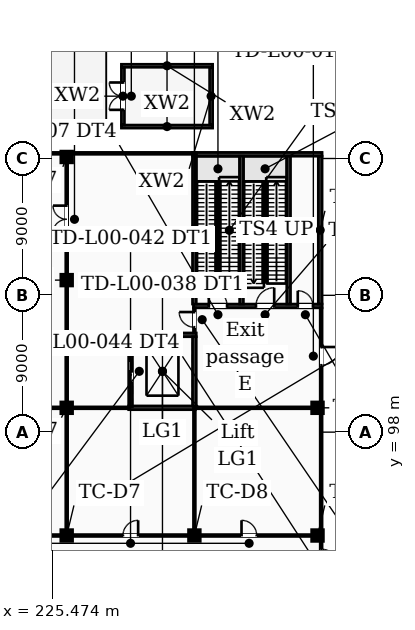
"""IFC4 building model, lengths in metres.
Left out: names, types, materials, properties, quantities, classifications, styles, units other than length and angle.
Written with IfcOpenShell. Run it as: python <this file> out.ifc"""

import sys

from ifc_helpers import new_model, si_unit, direction, frame, frame_2d, origin, origin_2d, place, context, subcontext, project, spatial, rectangle, extrude, element, fill, save


model = new_model("IFC4")
c1 = context("Model", 3, precision=1e-05, world=origin(), true_north=direction((0.0, 1.0)))
c2 = subcontext(c1, "Body", "Model", "MODEL_VIEW")
j1 = project(units=[si_unit("LENGTHUNIT", "METRE"), si_unit("PLANEANGLEUNIT", "RADIAN")], contexts=[c1])
p1 = place(None, origin())
s1 = spatial("IfcSite", under=j1, at=p1, CompositionType="ELEMENT")
p2 = place(p1, origin())
s2 = spatial("IfcBuilding", under=s1, at=p2, CompositionType="ELEMENT")
p3 = place(p2, origin())
s3 = spatial("IfcBuildingStorey", under=s2, at=p3, CompositionType="ELEMENT", Elevation=0.0)
p4 = place(p3, frame((218.2, 91.2, 0.0), z_axis=(0.0, 0.0, 1.0), x_axis=(1.0, 0.0, 0.0)))
e1 = element("IfcWall", 1, at=p4, inside=s3, PredefinedType="PARTITIONING", context=c2, shape_type="SweptSolid", body=[
    extrude(rectangle(XDim=7.9, YDim=0.125, at=frame_2d((3.95, 0.0))), origin(), (0.0, 0.0, 1.0), 8.7),
])
p5 = place(p4, frame((3.5, 0.0, 0.0)))
e2 = element("IfcOpeningElement", 2, at=p5, cuts=e1, PredefinedType="OPENING", context=c2, shape_type="SweptSolid", body=[
    extrude(rectangle(XDim=1.0, YDim=2.1, at=frame_2d((0.5, 1.05))), frame((0.0, 0.073, 0.0), z_axis=(0.0, -1.0, 0.0), x_axis=(1.0, 0.0, 0.0)), (0.0, 0.0, 1.0), 0.145),
])
p6 = place(p3, frame((226.7, 91.2, 0.0), z_axis=(0.0, 0.0, 1.0), x_axis=(1.0, 0.0, 0.0)))
e3 = element("IfcWall", 3, at=p6, inside=s3, PredefinedType="PARTITIONING", context=c2, shape_type="SweptSolid", body=[
    extrude(rectangle(XDim=7.8, YDim=0.125, at=frame_2d((3.9, 0.0))), origin(), (0.0, 0.0, 1.0), 8.7),
])
p7 = place(p6, frame((3.4, 0.0, 0.0)))
e4 = element("IfcOpeningElement", 4, at=p7, cuts=e3, PredefinedType="OPENING", context=c2, shape_type="SweptSolid", body=[
    extrude(rectangle(XDim=1.0, YDim=2.1, at=frame_2d((0.5, 1.05))), frame((0.0, 0.073, 0.0), z_axis=(0.0, -1.0, 0.0), x_axis=(1.0, 0.0, 0.0)), (0.0, 0.0, 1.0), 0.145),
])
p8 = place(p3, frame((235.1, 91.2, 0.0), z_axis=(0.0, 0.0, 1.0), x_axis=(1.0, 0.0, 0.0)))
e5 = element("IfcWall", 5, at=p8, inside=s3, PredefinedType="PARTITIONING", context=c2, shape_type="SweptSolid", body=[
    extrude(rectangle(XDim=7.5, YDim=0.125, at=frame_2d((3.75, 0.0))), origin(), (0.0, 0.0, 1.0), 8.7),
])
p9 = place(p8, frame((2.8, 0.0, 0.0)))
e6 = element("IfcOpeningElement", 6, at=p9, cuts=e5, PredefinedType="OPENING", context=c2, shape_type="SweptSolid", body=[
    extrude(rectangle(XDim=1.0, YDim=2.1, at=frame_2d((0.5, 1.05))), frame((0.0, 0.073, 0.0), z_axis=(0.0, -1.0, 0.0), x_axis=(1.0, 0.0, 0.0)), (0.0, 0.0, 1.0), 0.145),
])
p10 = place(p3, frame((218.2, 99.6, 0.0), z_axis=(0.0, 0.0, 1.0), x_axis=(1.0, 0.0, 0.0)))
e7 = element("IfcWall", 7, at=p10, inside=s3, PredefinedType="PARTITIONING", context=c2, shape_type="SweptSolid", body=[
    extrude(rectangle(XDim=7.9, YDim=0.125, at=frame_2d((3.95, 0.0))), origin(), (0.0, 0.0, 1.0), 8.7),
])
p11 = place(p10, frame((3.1, 0.0, 0.0)))
e8 = element("IfcOpeningElement", 8, at=p11, cuts=e7, PredefinedType="OPENING", context=c2, shape_type="SweptSolid", body=[
    extrude(rectangle(XDim=1.8, YDim=2.1, at=frame_2d((0.9, 1.05))), frame((0.0, 0.073, 0.0), z_axis=(0.0, -1.0, 0.0), x_axis=(1.0, 0.0, 0.0)), (0.0, 0.0, 1.0), 0.145),
])
p12 = place(p3, frame((226.7, 99.6, 0.0), z_axis=(0.0, 0.0, 1.0), x_axis=(1.0, 0.0, 0.0)))
e9 = element("IfcWall", 9, at=p12, inside=s3, PredefinedType="PARTITIONING", context=c2, shape_type="SweptSolid", body=[
    extrude(rectangle(XDim=4.025, YDim=0.125, at=frame_2d((2.013, 0.0))), origin(), (0.0, 0.0, 1.0), 8.7),
])
p13 = place(p3, frame((230.475, 99.6, 0.0), z_axis=(0.0, 0.0, 1.0), x_axis=(1.0, 0.0, 0.0)))
e10 = element("IfcWall", 10, at=p13, inside=s3, PredefinedType="SOLIDWALL", context=c2, shape_type="SweptSolid", body=[
    extrude(rectangle(XDim=4.387, YDim=0.25, at=frame_2d((2.194, 0.0))), origin(), (0.0, 0.0, 1.0), 8.7),
])
p14 = place(p3, frame((234.738, 99.6, 0.0), z_axis=(0.0, 0.0, 1.0), x_axis=(1.0, 0.0, 0.0)))
e11 = element("IfcWall", 11, at=p14, inside=s3, PredefinedType="PARTITIONING", context=c2, shape_type="SweptSolid", body=[
    extrude(rectangle(XDim=7.863, YDim=0.125, at=frame_2d((3.931, 0.0))), origin(), (0.0, 0.0, 1.0), 8.7),
])
p15 = place(p3, frame((230.475, 104.4, 0.0), z_axis=(0.0, 0.0, 1.0), x_axis=(1.0, 0.0, 0.0)))
e12 = element("IfcWall", 12, at=p15, inside=s3, PredefinedType="SOLIDWALL", context=c2, shape_type="SweptSolid", body=[
    extrude(rectangle(XDim=4.45, YDim=0.25, at=frame_2d((2.225, 0.0))), origin(), (0.0, 0.0, 1.0), 8.7),
])
p16 = place(p3, frame((234.738, 106.3, 0.0), z_axis=(0.0, 0.0, 1.0), x_axis=(1.0, 0.0, 0.0)))
e13 = element("IfcWall", 13, at=p16, inside=s3, PredefinedType="SOLIDWALL", context=c2, shape_type="SweptSolid", body=[
    extrude(rectangle(XDim=8.462, YDim=0.25, at=frame_2d((4.231, 0.0))), origin(), (0.0, 0.0, 1.0), 8.7),
])
p17 = place(p16, frame((1.012, 0.0, 0.0)))
e14 = element("IfcOpeningElement", 14, at=p17, cuts=e13, PredefinedType="OPENING", context=c2, shape_type="SweptSolid", body=[
    extrude(rectangle(XDim=1.2, YDim=2.1, at=frame_2d((0.6, 1.05))), frame((0.0, 0.135, 0.0), z_axis=(0.0, -1.0, 0.0), x_axis=(1.0, 0.0, 0.0)), (0.0, 0.0, 1.0), 0.27),
])
p18 = place(p16, frame((4.113, 0.0, 0.0)))
e15 = element("IfcOpeningElement", 15, at=p18, cuts=e13, PredefinedType="OPENING", context=c2, shape_type="SweptSolid", body=[
    extrude(rectangle(XDim=1.2, YDim=2.1, at=frame_2d((0.6, 1.05))), frame((0.0, 0.135, 0.0), z_axis=(0.0, -1.0, 0.0), x_axis=(1.0, 0.0, 0.0)), (0.0, 0.0, 1.0), 0.27),
])
p19 = place(p16, frame((6.863, 0.0, 0.0)))
e16 = element("IfcOpeningElement", 16, at=p19, cuts=e13, PredefinedType="OPENING", context=c2, shape_type="SweptSolid", body=[
    extrude(rectangle(XDim=1.0, YDim=2.1, at=frame_2d((0.5, 1.05))), frame((0.0, 0.135, 0.0), z_axis=(0.0, -1.0, 0.0), x_axis=(1.0, 0.0, 0.0)), (0.0, 0.0, 1.0), 0.27),
])
p20 = place(p3, frame((234.675, 116.275, 0.0), z_axis=(0.0, 0.0, 1.0), x_axis=(1.0, 0.0, 0.0)))
e17 = element("IfcWall", 17, at=p20, inside=s3, PredefinedType="SOLIDWALL", context=c2, shape_type="SweptSolid", body=[
    extrude(rectangle(XDim=8.525, YDim=0.25, at=frame_2d((4.262, 0.0))), origin(), (0.0, 0.0, 1.0), 8.7),
])
p21 = place(p3, frame((217.8, 116.337, 0.0), z_axis=(0.0, 0.0, 1.0), x_axis=(1.0, 0.0, 0.0)))
e18 = element("IfcWall", 18, at=p21, inside=s3, PredefinedType="PARTITIONING", context=c2, shape_type="SweptSolid", body=[
    extrude(rectangle(XDim=8.3, YDim=0.125, at=frame_2d((4.15, 0.0))), origin(), (0.0, 0.0, 1.0), 8.7),
])
p22 = place(p3, frame((226.7, 116.337, 0.0), z_axis=(0.0, 0.0, 1.0), x_axis=(1.0, 0.0, 0.0)))
e19 = element("IfcWall", 19, at=p22, inside=s3, PredefinedType="PARTITIONING", context=c2, shape_type="SweptSolid", body=[
    extrude(rectangle(XDim=8.225, YDim=0.125, at=frame_2d((4.113, 0.0))), origin(), (0.0, 0.0, 1.0), 8.7),
])
for number, where, z_axis, x_axis in (
    (20, (226.4, 91.5, 0.0), (0.0, 0.0, 1.0), (0.0, 1.0, 0.0)),
    (21, (226.4, 99.9, 0.0), (0.0, 0.0, 1.0), (0.0, 1.0, 0.0)),
):
    element("IfcWall", number, at=place(p3, frame(where, z_axis=z_axis, x_axis=x_axis)), inside=s3, PredefinedType="PARTITIONING", context=c2, shape_type="SweptSolid", body=[
        extrude(rectangle(XDim=7.8, YDim=0.125, at=frame_2d((3.9, 0.0))), origin(), (0.0, 0.0, 1.0), 8.7),
    ])
p23 = place(p3, frame((226.4, 108.3, 0.0), z_axis=(0.0, 0.0, 1.0), x_axis=(0.0, 1.0, 0.0)))
e22 = element("IfcWall", 22, at=p23, inside=s3, PredefinedType="PARTITIONING", context=c2, shape_type="SweptSolid", body=[
    extrude(rectangle(XDim=7.5, YDim=0.125, at=frame_2d((3.75, 0.0))), origin(), (0.0, 0.0, 1.0), 8.7),
])
p24 = place(p23, frame((2.8, 0.0, 0.0)))
e23 = element("IfcOpeningElement", 23, at=p24, cuts=e22, PredefinedType="OPENING", context=c2, shape_type="SweptSolid", body=[
    extrude(rectangle(XDim=1.8, YDim=2.1, at=frame_2d((0.9, 1.05))), frame((0.0, 0.073, 0.0), z_axis=(0.0, -1.0, 0.0), x_axis=(1.0, 0.0, 0.0)), (0.0, 0.0, 1.0), 0.145),
])
p25 = place(p3, frame((230.6, 99.663, 0.0), z_axis=(0.0, 0.0, 1.0), x_axis=(0.0, 1.0, 0.0)))
e24 = element("IfcWall", 24, at=p25, inside=s3, PredefinedType="SOLIDWALL", context=c2, shape_type="SweptSolid", body=[
    extrude(rectangle(XDim=4.612, YDim=0.25, at=frame_2d((2.306, 0.0))), origin(), (0.0, 0.0, 1.0), 8.7),
])
p26 = place(p25, frame((1.637, 0.0, 0.0)))
e25 = element("IfcOpeningElement", 25, at=p26, cuts=e24, PredefinedType="OPENING", context=c2, shape_type="SweptSolid", body=[
    extrude(rectangle(XDim=1.4, YDim=2.1, at=frame_2d((0.7, 1.05))), frame((0.0, 0.135, 0.0), z_axis=(0.0, -1.0, 0.0), x_axis=(1.0, 0.0, 0.0)), (0.0, 0.0, 1.0), 0.27),
])
p27 = place(p3, frame((234.8, 91.5, 0.0), z_axis=(0.0, 0.0, 1.0), x_axis=(0.0, 1.0, 0.0)))
e26 = element("IfcWall", 26, at=p27, inside=s3, PredefinedType="PARTITIONING", context=c2, shape_type="SweptSolid", body=[
    extrude(rectangle(XDim=7.975, YDim=0.125, at=frame_2d((3.988, 0.0))), origin(), (0.0, 0.0, 1.0), 8.7),
])
p28 = place(p3, frame((234.8, 99.725, 0.0), z_axis=(0.0, 0.0, 1.0), x_axis=(0.0, 1.0, 0.0)))
e27 = element("IfcWall", 27, at=p28, inside=s3, PredefinedType="SOLIDWALL", context=c2, shape_type="SweptSolid", body=[
    extrude(rectangle(XDim=4.55, YDim=0.25, at=frame_2d((2.275, 0.0))), origin(), (0.0, 0.0, 1.0), 8.7),
])
p29 = place(p3, frame((234.8, 104.525, 0.0), z_axis=(0.0, 0.0, 1.0), x_axis=(0.0, 1.0, 0.0)))
e28 = element("IfcWall", 28, at=p29, inside=s3, PredefinedType="PARTITIONING", context=c2, shape_type="SweptSolid", body=[
    extrude(rectangle(XDim=1.65, YDim=0.125, at=frame_2d((0.825, 0.0))), origin(), (0.0, 0.0, 1.0), 8.7),
])
p30 = place(p29, frame((0.375, 0.0, 0.0)))
e29 = element("IfcOpeningElement", 29, at=p30, cuts=e28, PredefinedType="OPENING", context=c2, shape_type="SweptSolid", body=[
    extrude(rectangle(XDim=1.0, YDim=2.1, at=frame_2d((0.5, 1.05))), frame((0.0, 0.073, 0.0), z_axis=(0.0, -1.0, 0.0), x_axis=(1.0, 0.0, 0.0)), (0.0, 0.0, 1.0), 0.145),
])
p31 = place(p3, frame((234.8, 106.425, 0.0), z_axis=(0.0, 0.0, 1.0), x_axis=(0.0, 1.0, 0.0)))
e30 = element("IfcWall", 30, at=p31, inside=s3, PredefinedType="SOLIDWALL", context=c2, shape_type="SweptSolid", body=[
    extrude(rectangle(XDim=9.85, YDim=0.25, at=frame_2d((4.925, 0.0))), origin(), (0.0, 0.0, 1.0), 8.7),
])
for number, where, z_axis, x_axis in (
    (31, (237.9, 106.425, 0.0), (0.0, 0.0, 1.0), (0.0, 1.0, 0.0)),
    (32, (241.0, 106.425, 0.0), (0.0, 0.0, 1.0), (0.0, 1.0, 0.0)),
    (33, (243.075, 106.425, 0.0), (0.0, 0.0, 1.0), (0.0, 1.0, 0.0)),
):
    element("IfcWall", number, at=place(p3, frame(where, z_axis=z_axis, x_axis=x_axis)), inside=s3, PredefinedType="SOLIDWALL", context=c2, shape_type="SweptSolid", body=[
        extrude(rectangle(XDim=9.725, YDim=0.25, at=frame_2d((4.862, 0.0))), origin(), (0.0, 0.0, 1.0), 8.7),
    ])
p32 = place(p3, frame((243.137, 90.9, 0.0), z_axis=(0.0, 0.0, 1.0), x_axis=(0.0, -1.0, 0.0)))
e34 = element("IfcWall", 34, at=p32, inside=s3, PredefinedType="PARTITIONING", context=c2, shape_type="SweptSolid", body=[
    extrude(rectangle(XDim=7.8, YDim=0.125, at=frame_2d((3.9, 0.0))), origin(), (0.0, 0.0, 1.0), 8.7),
])
p33 = place(p32, frame((0.6, 0.0, 0.0)))
e35 = element("IfcOpeningElement", 35, at=p33, cuts=e34, PredefinedType="OPENING", context=c2, shape_type="SweptSolid", body=[
    extrude(rectangle(XDim=1.2, YDim=2.1, at=frame_2d((0.6, 1.05))), frame((0.0, 0.073, 0.0), z_axis=(0.0, -1.0, 0.0), x_axis=(1.0, 0.0, 0.0)), (0.0, 0.0, 1.0), 0.145),
])
p34 = place(p3, frame((243.137, 91.5, 0.0), z_axis=(0.0, 0.0, 1.0), x_axis=(0.0, 1.0, 0.0)))
e36 = element("IfcWall", 36, at=p34, inside=s3, PredefinedType="PARTITIONING", context=c2, shape_type="SweptSolid", body=[
    extrude(rectangle(XDim=7.8, YDim=0.125, at=frame_2d((3.9, 0.0))), origin(), (0.0, 0.0, 1.0), 8.7),
])
p35 = place(p3, frame((243.137, 106.175, 0.0), z_axis=(0.0, 0.0, 1.0), x_axis=(0.0, -1.0, 0.0)))
e37 = element("IfcWall", 37, at=p35, inside=s3, PredefinedType="PARTITIONING", context=c2, shape_type="SweptSolid", body=[
    extrude(rectangle(XDim=6.275, YDim=0.125, at=frame_2d((3.138, 0.0))), origin(), (0.0, 0.0, 1.0), 8.7),
])
p36 = place(p35, frame((2.575, 0.0, 0.0)))
e38 = element("IfcOpeningElement", 38, at=p36, cuts=e37, PredefinedType="OPENING", context=c2, shape_type="SweptSolid", body=[
    extrude(rectangle(XDim=1.2, YDim=2.1, at=frame_2d((0.6, 1.05))), frame((0.0, 0.073, 0.0), z_axis=(0.0, -1.0, 0.0), x_axis=(1.0, 0.0, 0.0)), (0.0, 0.0, 1.0), 0.145),
])
for number, where, z_axis, x_axis in (
    (39, (226.4, 91.2, 0.0), (0.0, 0.0, 1.0), (1.0, 0.0, 0.0)),
    (40, (226.4, 99.6, 0.0), (0.0, 0.0, 1.0), (1.0, 0.0, 0.0)),
    (41, (226.4, 108.0, 0.0), (0.0, 0.0, 1.0), (1.0, 0.0, 0.0)),
    (42, (226.4, 116.1, 0.0), (0.0, 0.0, 1.0), (1.0, 0.0, 0.0)),
    (43, (234.8, 91.2, 0.0), (0.0, 0.0, 1.0), (1.0, 0.0, 0.0)),
    (44, (242.9, 91.2, 0.0), (0.0, 0.0, 1.0), (1.0, 0.0, 0.0)),
    (45, (242.9, 99.6, 0.0), (0.0, 0.0, 1.0), (1.0, 0.0, 0.0)),
):
    element("IfcColumn", number, at=place(p3, frame(where, z_axis=z_axis, x_axis=x_axis)), inside=s3, PredefinedType="COLUMN", context=c2, shape_type="SweptSolid", body=[
        extrude(rectangle(XDim=0.6, YDim=0.6, at=origin_2d()), origin(), (0.0, 0.0, 1.0), 8.7),
    ])
for number, where, z_axis, x_axis in (
    (46, (230.475, 99.6, -1.4), (0.0, 0.0, 1.0), (1.0, 0.0, 0.0)),
    (47, (230.475, 104.4, -1.4), (0.0, 0.0, 1.0), (1.0, 0.0, 0.0)),
):
    element("IfcWall", number, at=place(p3, frame(where, z_axis=z_axis, x_axis=x_axis)), inside=s3, PredefinedType="SOLIDWALL", context=c2, shape_type="SweptSolid", body=[
        extrude(rectangle(XDim=4.45, YDim=0.25, at=frame_2d((2.225, 0.0))), origin(), (0.0, 0.0, 1.0), 1.1),
    ])
for number, where, z_axis, x_axis in (
    (48, (230.6, 99.725, -1.4), (0.0, 0.0, 1.0), (0.0, 1.0, 0.0)),
    (49, (234.8, 99.725, -1.4), (0.0, 0.0, 1.0), (0.0, 1.0, 0.0)),
):
    element("IfcWall", number, at=place(p3, frame(where, z_axis=z_axis, x_axis=x_axis)), inside=s3, PredefinedType="SOLIDWALL", context=c2, shape_type="SweptSolid", body=[
        extrude(rectangle(XDim=4.55, YDim=0.25, at=frame_2d((2.275, 0.0))), origin(), (0.0, 0.0, 1.0), 1.1),
    ])
for number, where, z_axis, x_axis in (
    (50, (230.0, 118.1, 0.0), (0.0, 0.0, 1.0), (1.0, 0.0, 0.0)),
    (51, (230.0, 122.1, 0.0), (0.0, 0.0, 1.0), (1.0, 0.0, 0.0)),
):
    element("IfcWall", number, at=place(p3, frame(where, z_axis=z_axis, x_axis=x_axis)), inside=s3, PredefinedType="SOLIDWALL", context=c2, shape_type="SweptSolid", body=[
        extrude(rectangle(XDim=6.0, YDim=0.2, at=frame_2d((3.0, 0.0))), origin(), (0.0, 0.0, 1.0), 2.8),
    ])
p37 = place(p3, frame((230.1, 118.2, 0.0), z_axis=(0.0, 0.0, 1.0), x_axis=(0.0, 1.0, 0.0)))
e52 = element("IfcWall", 52, at=p37, inside=s3, PredefinedType="SOLIDWALL", context=c2, shape_type="SweptSolid", body=[
    extrude(rectangle(XDim=3.8, YDim=0.2, at=frame_2d((1.9, 0.0))), origin(), (0.0, 0.0, 1.0), 2.8),
])
p38 = place(p37, frame((1.0, 0.0, 0.0)))
e53 = element("IfcOpeningElement", 53, at=p38, cuts=e52, PredefinedType="OPENING", context=c2, shape_type="SweptSolid", body=[
    extrude(rectangle(XDim=1.8, YDim=2.1, at=frame_2d((0.9, 1.05))), frame((0.0, 0.11, 0.0), z_axis=(0.0, -1.0, 0.0), x_axis=(1.0, 0.0, 0.0)), (0.0, 0.0, 1.0), 0.22),
])
p39 = place(p3, frame((235.9, 118.2, 0.0), z_axis=(0.0, 0.0, 1.0), x_axis=(0.0, 1.0, 0.0)))
e54 = element("IfcWall", 54, at=p39, inside=s3, PredefinedType="SOLIDWALL", context=c2, shape_type="SweptSolid", body=[
    extrude(rectangle(XDim=3.8, YDim=0.2, at=frame_2d((1.9, 0.0))), origin(), (0.0, 0.0, 1.0), 2.8),
])
p40 = place(p17, origin())
e55 = element("IfcDoor", 55, at=p40, inside=s3, OperationType="SINGLE_SWING_LEFT", PredefinedType="DOOR", context=c2, shape_type="SweptSolid", body=[
    extrude(rectangle(XDim=1.2, YDim=2.1, at=frame_2d((0.6, 1.05))), frame((0.0, 0.025, 0.0), z_axis=(0.0, -1.0, 0.0), x_axis=(1.0, 0.0, 0.0)), (0.0, 0.0, 1.0), 0.05),
])
fill(e14, e55)
p41 = place(p18, origin())
e56 = element("IfcDoor", 56, at=p41, inside=s3, OperationType="SINGLE_SWING_RIGHT", PredefinedType="DOOR", context=c2, shape_type="SweptSolid", body=[
    extrude(rectangle(XDim=1.2, YDim=2.1, at=frame_2d((0.6, 1.05))), frame((0.0, 0.025, 0.0), z_axis=(0.0, -1.0, 0.0), x_axis=(1.0, 0.0, 0.0)), (0.0, 0.0, 1.0), 0.05),
])
fill(e15, e56)
p42 = place(p19, origin())
e57 = element("IfcDoor", 57, at=p42, inside=s3, OperationType="SINGLE_SWING_LEFT", PredefinedType="DOOR", context=c2, shape_type="SweptSolid", body=[
    extrude(rectangle(XDim=1.0, YDim=2.1, at=frame_2d((0.5, 1.05))), frame((0.0, 0.025, 0.0), z_axis=(0.0, -1.0, 0.0), x_axis=(1.0, 0.0, 0.0)), (0.0, 0.0, 1.0), 0.05),
])
fill(e16, e57)
p43 = place(p30, origin())
e58 = element("IfcDoor", 58, at=p43, inside=s3, OperationType="SINGLE_SWING_RIGHT", PredefinedType="DOOR", context=c2, shape_type="SweptSolid", body=[
    extrude(rectangle(XDim=1.0, YDim=2.1, at=frame_2d((0.5, 1.05))), frame((0.0, 0.025, 0.0), z_axis=(0.0, -1.0, 0.0), x_axis=(1.0, 0.0, 0.0)), (0.0, 0.0, 1.0), 0.05),
])
fill(e29, e58)
p44 = place(p26, origin())
e59 = element("IfcDoor", 59, at=p44, inside=s3, OperationType="DOUBLE_DOOR_SLIDING", PredefinedType="DOOR", context=c2, shape_type="SweptSolid", body=[
    extrude(rectangle(XDim=1.4, YDim=2.1, at=frame_2d((0.7, 1.05))), frame((0.0, 0.025, 0.0), z_axis=(0.0, -1.0, 0.0), x_axis=(1.0, 0.0, 0.0)), (0.0, 0.0, 1.0), 0.05),
])
fill(e25, e59)
p45 = place(p36, origin())
e60 = element("IfcDoor", 60, at=p45, inside=s3, OperationType="SINGLE_SWING_LEFT", PredefinedType="DOOR", context=c2, shape_type="SweptSolid", body=[
    extrude(rectangle(XDim=1.2, YDim=2.1, at=frame_2d((0.6, 1.05))), frame((0.0, 0.025, 0.0), z_axis=(0.0, -1.0, 0.0), x_axis=(1.0, 0.0, 0.0)), (0.0, 0.0, 1.0), 0.05),
])
fill(e38, e60)
p46 = place(p7, origin())
e61 = element("IfcDoor", 61, at=p46, inside=s3, OperationType="SINGLE_SWING_RIGHT", PredefinedType="DOOR", context=c2, shape_type="SweptSolid", body=[
    extrude(rectangle(XDim=1.0, YDim=2.1, at=frame_2d((0.5, 1.05))), frame((0.0, 0.025, 0.0), z_axis=(0.0, -1.0, 0.0), x_axis=(1.0, 0.0, 0.0)), (0.0, 0.0, 1.0), 0.05),
])
fill(e4, e61)
p47 = place(p9, origin())
e62 = element("IfcDoor", 62, at=p47, inside=s3, OperationType="SINGLE_SWING_LEFT", PredefinedType="DOOR", context=c2, shape_type="SweptSolid", body=[
    extrude(rectangle(XDim=1.0, YDim=2.1, at=frame_2d((0.5, 1.05))), frame((0.0, 0.025, 0.0), z_axis=(0.0, -1.0, 0.0), x_axis=(1.0, 0.0, 0.0)), (0.0, 0.0, 1.0), 0.05),
])
fill(e6, e62)
p48 = place(p33, origin())
e63 = element("IfcDoor", 63, at=p48, inside=s3, OperationType="SINGLE_SWING_RIGHT", PredefinedType="DOOR", context=c2, shape_type="SweptSolid", body=[
    extrude(rectangle(XDim=1.2, YDim=2.1, at=frame_2d((0.6, 1.05))), frame((0.0, 0.025, 0.0), z_axis=(0.0, -1.0, 0.0), x_axis=(1.0, 0.0, 0.0)), (0.0, 0.0, 1.0), 0.05),
])
fill(e35, e63)
p49 = place(p24, origin())
e64 = element("IfcDoor", 64, at=p49, inside=s3, OperationType="DOUBLE_DOOR_SINGLE_SWING", PredefinedType="DOOR", context=c2, shape_type="SweptSolid", body=[
    extrude(rectangle(XDim=1.8, YDim=2.1, at=frame_2d((0.9, 1.05))), frame((0.0, 0.025, 0.0), z_axis=(0.0, -1.0, 0.0), x_axis=(1.0, 0.0, 0.0)), (0.0, 0.0, 1.0), 0.05),
])
fill(e23, e64)
p50 = place(p38, origin())
e65 = element("IfcDoor", 65, at=p50, inside=s3, OperationType="DOUBLE_DOOR_SINGLE_SWING", PredefinedType="DOOR", context=c2, shape_type="SweptSolid", body=[
    extrude(rectangle(XDim=1.8, YDim=2.1, at=frame_2d((0.9, 1.05))), frame((0.0, 0.025, 0.0), z_axis=(0.0, -1.0, 0.0), x_axis=(1.0, 0.0, 0.0)), (0.0, 0.0, 1.0), 0.05),
])
fill(e53, e65)
save(model, sys.argv[1])
